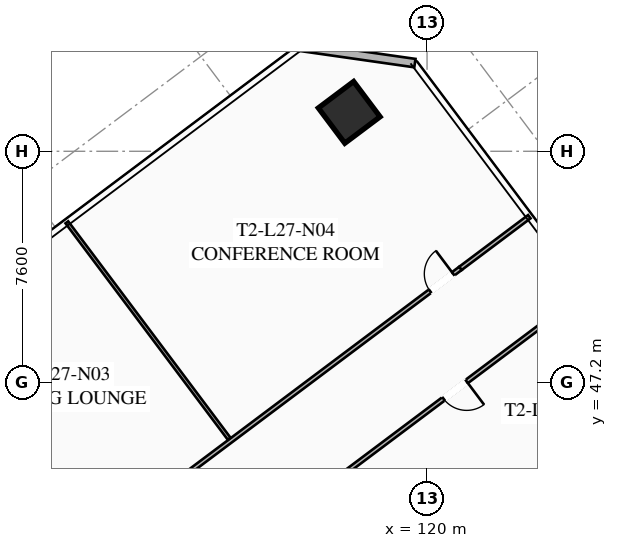
"""IFC4 building model, lengths in metres.
Left out: names, types, materials, properties, quantities, classifications, styles, units other than length and angle.
Written with IfcOpenShell. Run it as: python <this file> out.ifc"""

import sys

from ifc_helpers import new_model, si_unit, direction, frame, frame_2d, origin, origin_2d, place, context, subcontext, project, spatial, rectangle, hollow_rectangle, extrude, element, fill, save


model = new_model("IFC4")
c1 = context("Model", 3, precision=1e-05, world=origin(), true_north=direction((0.0, 1.0)))
c2 = subcontext(c1, "Body", "Model", "MODEL_VIEW")
j1 = project(units=[si_unit("LENGTHUNIT", "METRE"), si_unit("PLANEANGLEUNIT", "RADIAN")], contexts=[c1])
p1 = place(None, origin())
s1 = spatial("IfcSite", under=j1, at=p1, CompositionType="ELEMENT")
p2 = place(p1, origin())
s2 = spatial("IfcBuilding", under=s1, at=p2, CompositionType="ELEMENT")
p3 = place(p2, frame((0.0, 0.0, 102.7)))
s3 = spatial("IfcBuildingStorey", under=s2, at=p3, CompositionType="ELEMENT", Elevation=102.7)
p4 = place(p3, frame((117.44, 56.08, 0.0), z_axis=(0.0, 0.0, 1.0), x_axis=(0.799999996291, 0.600000004945, 0.0)))
e1 = element("IfcColumn", 1, at=p4, inside=s3, PredefinedType="COLUMN", context=c2, shape_type="SweptSolid", body=[
    extrude(hollow_rectangle(XDim=1.45, YDim=1.45, WallThickness=0.055, at=origin_2d()), origin(), (0.0, 0.0, 1.0), 3.35),
])
p5 = place(p3, frame((115.82, 58.24, 0.0), z_axis=(0.0, 0.0, 1.0), x_axis=(0.989948214866, -0.141430307517, 0.0)))
e2 = element("IfcWall", 2, at=p5, inside=s3, PredefinedType="SOLIDWALL", context=c2, shape_type="SweptSolid", body=[
    extrude(rectangle(XDim=3.818, YDim=0.28, at=frame_2d((1.909, 0.0))), origin(), (0.0, 0.0, 1.0), 3.35),
])
p6 = place(p3, frame((98.316, 33.862, 0.0), z_axis=(0.0, 0.0, 1.0), x_axis=(0.8000041147, 0.599994513695, 0.0)))
e3 = element("IfcWall", 3, at=p6, inside=s3, PredefinedType="PARTITIONING", context=c2, shape_type="SweptSolid", body=[
    extrude(rectangle(XDim=28.48, YDim=0.135, at=frame_2d((14.24, 0.0))), origin(), (0.0, 0.0, 1.0), 2.703),
])
p7 = place(p6, frame((0.3, 0.0, 0.0)))
e4 = element("IfcOpeningElement", 4, at=p7, cuts=e3, PredefinedType="OPENING", context=c2, shape_type="SweptSolid", body=[
    extrude(rectangle(XDim=0.95, YDim=2.05, at=frame_2d((0.475, 1.025))), frame((0.0, 0.077, 0.0), z_axis=(0.0, -1.0, 0.0), x_axis=(1.0, 0.0, 0.0)), (0.0, 0.0, 1.0), 0.155),
])
p8 = place(p6, frame((10.9, 0.0, 0.0)))
e5 = element("IfcOpeningElement", 5, at=p8, cuts=e3, PredefinedType="OPENING", context=c2, shape_type="SweptSolid", body=[
    extrude(rectangle(XDim=0.95, YDim=2.05, at=frame_2d((0.475, 1.025))), frame((0.0, 0.077, 0.0), z_axis=(0.0, -1.0, 0.0), x_axis=(1.0, 0.0, 0.0)), (0.0, 0.0, 1.0), 0.155),
])
p9 = place(p6, frame((14.9, 0.0, 0.0)))
e6 = element("IfcOpeningElement", 6, at=p9, cuts=e3, PredefinedType="OPENING", context=c2, shape_type="SweptSolid", body=[
    extrude(rectangle(XDim=0.95, YDim=2.05, at=frame_2d((0.475, 1.025))), frame((0.0, 0.077, 0.0), z_axis=(0.0, -1.0, 0.0), x_axis=(1.0, 0.0, 0.0)), (0.0, 0.0, 1.0), 0.155),
])
p10 = place(p6, frame((27.23, 0.0, 0.0)))
e7 = element("IfcOpeningElement", 7, at=p10, cuts=e3, PredefinedType="OPENING", context=c2, shape_type="SweptSolid", body=[
    extrude(rectangle(XDim=0.95, YDim=2.05, at=frame_2d((0.475, 1.025))), frame((0.0, 0.077, 0.0), z_axis=(0.0, -1.0, 0.0), x_axis=(1.0, 0.0, 0.0)), (0.0, 0.0, 1.0), 0.155),
])
p11 = place(p3, frame((121.1, 50.95, 0.0), z_axis=(0.0, 0.0, 1.0), x_axis=(0.799989647378, 0.600013803248, 0.0)))
e8 = element("IfcWall", 8, at=p11, inside=s3, PredefinedType="PARTITIONING", context=c2, shape_type="SweptSolid", body=[
    extrude(rectangle(XDim=2.83, YDim=0.135, at=frame_2d((1.415, 0.0))), origin(), (0.0, 0.0, 1.0), 2.703),
])
p12 = place(p3, frame((108.052, 41.264, 0.0), z_axis=(0.0, 0.0, 1.0), x_axis=(-0.6, 0.8, 0.0)))
e9 = element("IfcWall", 9, at=p12, inside=s3, PredefinedType="PARTITIONING", context=c2, shape_type="SweptSolid", body=[
    extrude(rectangle(XDim=8.9, YDim=0.11, at=frame_2d((4.45, 0.0))), origin(), (0.0, 0.0, 1.0), 2.703),
])
p13 = place(p3, frame((113.492, 45.344, 0.0), z_axis=(0.0, 0.0, 1.0), x_axis=(-0.599982443676, 0.800013166942, 0.0)))
e10 = element("IfcWall", 10, at=p13, inside=s3, PredefinedType="PARTITIONING", context=c2, shape_type="SweptSolid", body=[
    extrude(rectangle(XDim=8.9, YDim=0.11, at=frame_2d((4.45, 0.0))), origin(), (0.0, 0.0, 1.0), 2.703),
])
p14 = place(p3, frame((125.224, 50.168, 0.0), z_axis=(0.0, 0.0, 1.0), x_axis=(-0.8, -0.6, 0.0)))
e11 = element("IfcWall", 11, at=p14, inside=s3, PredefinedType="PARTITIONING", context=c2, shape_type="SweptSolid", body=[
    extrude(rectangle(XDim=10.05, YDim=0.135, at=frame_2d((5.025, 0.0))), origin(), (0.0, 0.0, 1.0), 2.703),
])
p15 = place(p14, frame((4.9, 0.0, 0.0)))
e12 = element("IfcOpeningElement", 12, at=p15, cuts=e11, PredefinedType="OPENING", context=c2, shape_type="SweptSolid", body=[
    extrude(rectangle(XDim=0.95, YDim=2.05, at=frame_2d((0.475, 1.025))), frame((0.0, 0.077, 0.0), z_axis=(0.0, -1.0, 0.0), x_axis=(1.0, 0.0, 0.0)), (0.0, 0.0, 1.0), 0.155),
])
p16 = place(p3, frame((127.864, 46.648, 0.0), z_axis=(0.0, 0.0, 1.0), x_axis=(-0.800007145523, -0.599990472518, 0.0)))
e13 = element("IfcWall", 13, at=p16, inside=s3, PredefinedType="PARTITIONING", context=c2, shape_type="SweptSolid", body=[
    extrude(rectangle(XDim=8.2, YDim=0.11, at=frame_2d((4.1, 0.0))), origin(), (0.0, 0.0, 1.0), 2.703),
])
p17 = place(p10, origin())
e14 = element("IfcDoor", 14, at=p17, inside=s3, OperationType="SINGLE_SWING_RIGHT", PredefinedType="DOOR", context=c2, shape_type="SweptSolid", body=[
    extrude(rectangle(XDim=0.95, YDim=2.05, at=frame_2d((0.475, 1.025))), frame((0.0, 0.025, 0.0), z_axis=(0.0, -1.0, 0.0), x_axis=(1.0, 0.0, 0.0)), (0.0, 0.0, 1.0), 0.05),
])
fill(e7, e14)
p18 = place(p15, origin())
e15 = element("IfcDoor", 15, at=p18, inside=s3, OperationType="SINGLE_SWING_LEFT", PredefinedType="DOOR", context=c2, shape_type="SweptSolid", body=[
    extrude(rectangle(XDim=0.95, YDim=2.05, at=frame_2d((0.475, 1.025))), frame((0.0, 0.025, 0.0), z_axis=(0.0, -1.0, 0.0), x_axis=(1.0, 0.0, 0.0)), (0.0, 0.0, 1.0), 0.05),
])
fill(e12, e15)
save(model, sys.argv[1])
